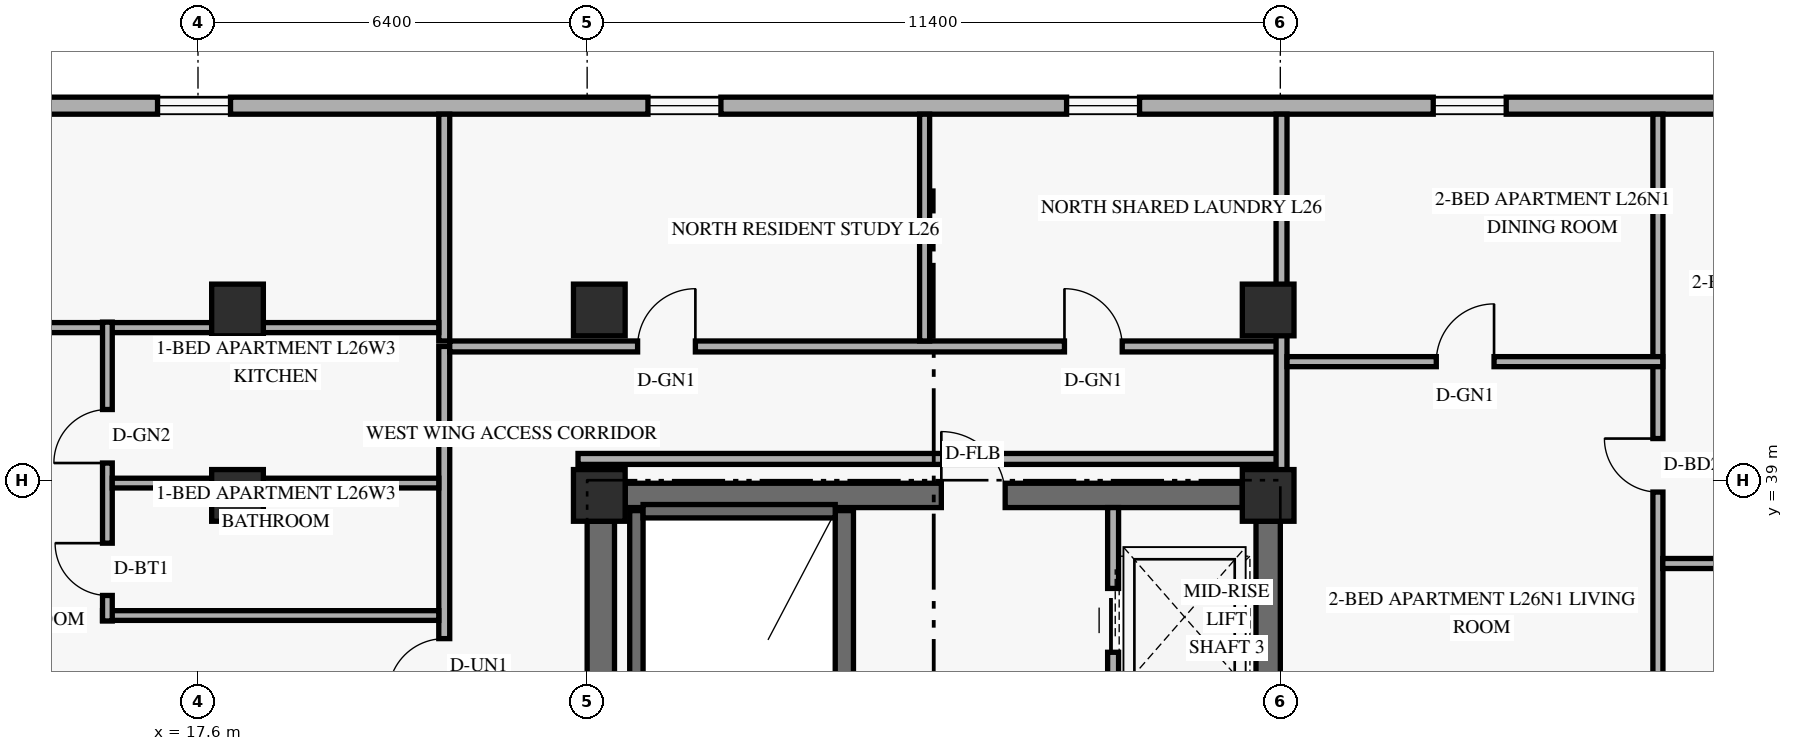
"""IFC4 building model, lengths in metres.
Left out: names, types, materials, properties, quantities, classifications, styles, units other than length and angle.
Written with IfcOpenShell. Run it as: python <this file> out.ifc"""

import sys

from ifc_helpers import new_model, si_unit, direction, frame, frame_2d, origin, origin_2d, place, context, subcontext, project, spatial, rectangle, extrude, element, fill, save


model = new_model("IFC4")
c1 = context("Model", 3, precision=1e-05, world=origin(), true_north=direction((0.0, 1.0)))
c2 = subcontext(c1, "Body", "Model", "MODEL_VIEW")
j1 = project(units=[si_unit("LENGTHUNIT", "METRE"), si_unit("PLANEANGLEUNIT", "RADIAN")], contexts=[c1])
p1 = place(None, origin())
s1 = spatial("IfcSite", under=j1, at=p1, CompositionType="ELEMENT")
p2 = place(p1, origin())
s2 = spatial("IfcBuilding", under=s1, at=p2, CompositionType="ELEMENT")
p3 = place(p2, frame((0.0, 0.0, 102.6)))
s3 = spatial("IfcBuildingStorey", under=s2, at=p3, CompositionType="ELEMENT", Elevation=102.6)
p4 = place(p3, frame((24.225, 30.625, 0.0), z_axis=(0.0, 0.0, 1.0), x_axis=(0.0, 1.0, 0.0)))
e1 = element("IfcWall", 1, at=p4, inside=s3, PredefinedType="SHEAR", context=c2, shape_type="SweptSolid", body=[
    extrude(rectangle(XDim=7.7, YDim=0.45, at=frame_2d((3.85, 0.0))), origin(), (0.0, 0.0, 1.0), 2.749),
])
p5 = place(p3, frame((35.2, 31.35, 0.0), z_axis=(0.0, 0.0, 1.0), x_axis=(0.0, 1.0, 0.0)))
e2 = element("IfcWall", 2, at=p5, inside=s3, PredefinedType="SHEAR", context=c2, shape_type="SweptSolid", body=[
    extrude(rectangle(XDim=6.975, YDim=0.4, at=frame_2d((3.487, 0.0))), origin(), (0.0, 0.0, 1.0), 2.749),
])
p6 = place(p3, frame((24.625, 38.75, 0.0), z_axis=(0.0, 0.0, 1.0), x_axis=(1.0, 0.0, 0.0)))
e3 = element("IfcWall", 3, at=p6, inside=s3, PredefinedType="SHEAR", context=c2, shape_type="SweptSolid", body=[
    extrude(rectangle(XDim=10.15, YDim=0.4, at=frame_2d((5.075, 0.0))), origin(), (0.0, 0.0, 1.0), 3.36),
])
p7 = place(p6, frame((5.2, 0.0, 0.0)))
e4 = element("IfcOpeningElement", 4, at=p7, cuts=e3, PredefinedType="OPENING", context=c2, shape_type="SweptSolid", body=[
    extrude(rectangle(XDim=1.05, YDim=2.15, at=frame_2d((0.525, 1.075))), frame((0.0, 0.21, 0.0), z_axis=(0.0, -1.0, 0.0), x_axis=(1.0, 0.0, 0.0)), (0.0, 0.0, 1.0), 0.42),
])
p8 = place(p3, frame((24.81, 30.74, 0.0), z_axis=(0.0, 0.0, 1.0), x_axis=(0.0, 1.0, 0.0)))
e5 = element("IfcWall", 5, at=p8, inside=s3, PredefinedType="SHEAR", context=c2, shape_type="SweptSolid", body=[
    extrude(rectangle(XDim=7.76, YDim=0.22, at=frame_2d((3.88, 0.0))), origin(), (0.0, 0.0, 1.0), 3.36),
])
p9 = place(p3, frame((28.23, 30.74, 0.0), z_axis=(0.0, 0.0, 1.0), x_axis=(0.0, 1.0, 0.0)))
e6 = element("IfcWall", 6, at=p9, inside=s3, PredefinedType="SHEAR", context=c2, shape_type="SweptSolid", body=[
    extrude(rectangle(XDim=7.76, YDim=0.3, at=frame_2d((3.88, 0.0))), origin(), (0.0, 0.0, 1.0), 3.36),
])
p10 = place(p3, frame((24.92, 38.49, 0.0), z_axis=(0.0, 0.0, 1.0), x_axis=(1.0, 0.0, 0.0)))
e7 = element("IfcWall", 7, at=p10, inside=s3, PredefinedType="SHEAR", context=c2, shape_type="SweptSolid", body=[
    extrude(rectangle(XDim=3.16, YDim=0.22, at=frame_2d((1.58, 0.0))), origin(), (0.0, 0.0, 1.0), 3.36),
])
for number, where, z_axis, x_axis in (
    (8, (18.25, 38.75, 0.0), (0.0, 0.0, 1.0), (1.0, 0.0, 0.0)),
    (9, (18.25, 41.8, 0.0), (0.0, 0.0, 1.0), (1.0, 0.0, 0.0)),
    (10, (24.2, 38.75, 0.0), (0.0, 0.0, 1.0), (1.0, 0.0, 0.0)),
    (11, (24.2, 41.8, 0.0), (0.0, 0.0, 1.0), (1.0, 0.0, 0.0)),
    (12, (35.2, 38.75, 0.0), (0.0, 0.0, 1.0), (1.0, 0.0, 0.0)),
    (13, (35.2, 41.8, 0.0), (0.0, 0.0, 1.0), (1.0, 0.0, 0.0)),
):
    element("IfcColumn", number, at=place(p3, frame(where, z_axis=z_axis, x_axis=x_axis)), inside=s3, PredefinedType="COLUMN", context=c2, shape_type="SweptSolid", body=[
        extrude(rectangle(XDim=0.85, YDim=0.85, at=origin_2d()), origin(), (0.0, 0.0, 1.0), 3.6),
    ])
p11 = place(p3, frame((49.98, 45.16, 0.0), z_axis=(0.0, 0.0, 1.0), x_axis=(-1.0, 0.0, 0.0)))
e14 = element("IfcWall", 14, at=p11, inside=s3, PredefinedType="SOLIDWALL", context=c2, shape_type="SweptSolid", body=[
    extrude(rectangle(XDim=36.56, YDim=0.28, at=frame_2d((18.28, 0.0))), origin(), (0.0, 0.0, 1.0), 3.36),
])
p12 = place(p11, frame((31.845, 0.0, 0.85)))
e15 = element("IfcOpeningElement", 15, at=p12, cuts=e14, PredefinedType="OPENING", context=c2, shape_type="SweptSolid", body=[
    extrude(rectangle(XDim=1.2, YDim=1.5, at=frame_2d((0.6, 0.75))), frame((0.0, 0.15, 0.0), z_axis=(0.0, -1.0, 0.0), x_axis=(1.0, 0.0, 0.0)), (0.0, 0.0, 1.0), 0.3),
])
p13 = place(p11, frame((23.78, 0.0, 0.85)))
e16 = element("IfcOpeningElement", 16, at=p13, cuts=e14, PredefinedType="OPENING", context=c2, shape_type="SweptSolid", body=[
    extrude(rectangle(XDim=1.2, YDim=1.5, at=frame_2d((0.6, 0.75))), frame((0.0, 0.15, 0.0), z_axis=(0.0, -1.0, 0.0), x_axis=(1.0, 0.0, 0.0)), (0.0, 0.0, 1.0), 0.3),
])
p14 = place(p11, frame((16.895, 0.0, 0.85)))
e17 = element("IfcOpeningElement", 17, at=p14, cuts=e14, PredefinedType="OPENING", context=c2, shape_type="SweptSolid", body=[
    extrude(rectangle(XDim=1.2, YDim=1.5, at=frame_2d((0.6, 0.75))), frame((0.0, 0.15, 0.0), z_axis=(0.0, -1.0, 0.0), x_axis=(1.0, 0.0, 0.0)), (0.0, 0.0, 1.0), 0.3),
])
p15 = place(p11, frame((10.865, 0.0, 0.85)))
e18 = element("IfcOpeningElement", 18, at=p15, cuts=e14, PredefinedType="OPENING", context=c2, shape_type="SweptSolid", body=[
    extrude(rectangle(XDim=1.2, YDim=1.5, at=frame_2d((0.6, 0.75))), frame((0.0, 0.15, 0.0), z_axis=(0.0, -1.0, 0.0), x_axis=(1.0, 0.0, 0.0)), (0.0, 0.0, 1.0), 0.3),
])
p16 = place(p11, frame((5.275, 0.0, 0.85)))
e19 = element("IfcOpeningElement", 19, at=p16, cuts=e14, PredefinedType="OPENING", context=c2, shape_type="SweptSolid", body=[
    extrude(rectangle(XDim=1.2, YDim=1.5, at=frame_2d((0.6, 0.75))), frame((0.0, 0.15, 0.0), z_axis=(0.0, -1.0, 0.0), x_axis=(1.0, 0.0, 0.0)), (0.0, 0.0, 1.0), 0.3),
])
p17 = place(p11, frame((1.09, 0.0, 0.85)))
e20 = element("IfcOpeningElement", 20, at=p17, cuts=e14, PredefinedType="OPENING", context=c2, shape_type="SweptSolid", body=[
    extrude(rectangle(XDim=1.2, YDim=1.5, at=frame_2d((0.6, 0.75))), frame((0.0, 0.15, 0.0), z_axis=(0.0, -1.0, 0.0), x_axis=(1.0, 0.0, 0.0)), (0.0, 0.0, 1.0), 0.3),
])
p18 = place(p3, frame((32.65, 31.35, 0.0), z_axis=(0.0, 0.0, 1.0), x_axis=(0.0, 1.0, 0.0)))
e21 = element("IfcWall", 21, at=p18, inside=s3, PredefinedType="STANDARD", context=c2, shape_type="SweptSolid", body=[
    extrude(rectangle(XDim=7.2, YDim=0.18, at=frame_2d((3.6, 0.0))), origin(), (0.0, 0.0, 1.0), 3.36),
])
p19 = place(p18, frame((0.52, 0.0, 0.0)))
e22 = element("IfcOpeningElement", 22, at=p19, cuts=e21, PredefinedType="OPENING", context=c2, shape_type="SweptSolid", body=[
    extrude(rectangle(XDim=1.05, YDim=2.2, at=frame_2d((0.525, 1.1))), frame((0.0, 0.1, 0.0), z_axis=(0.0, -1.0, 0.0), x_axis=(1.0, 0.0, 0.0)), (0.0, 0.0, 1.0), 0.2),
])
p20 = place(p18, frame((2.67, 0.0, 0.0)))
e23 = element("IfcOpeningElement", 23, at=p20, cuts=e21, PredefinedType="OPENING", context=c2, shape_type="SweptSolid", body=[
    extrude(rectangle(XDim=1.05, YDim=2.2, at=frame_2d((0.525, 1.1))), frame((0.0, 0.1, 0.0), z_axis=(0.0, -1.0, 0.0), x_axis=(1.0, 0.0, 0.0)), (0.0, 0.0, 1.0), 0.2),
])
p21 = place(p18, frame((4.82, 0.0, 0.0)))
e24 = element("IfcOpeningElement", 24, at=p21, cuts=e21, PredefinedType="OPENING", context=c2, shape_type="SweptSolid", body=[
    extrude(rectangle(XDim=1.05, YDim=2.2, at=frame_2d((0.525, 1.1))), frame((0.0, 0.1, 0.0), z_axis=(0.0, -1.0, 0.0), x_axis=(1.0, 0.0, 0.0)), (0.0, 0.0, 1.0), 0.2),
])
p22 = place(p3, frame((21.65, 6.8, 0.0), z_axis=(0.0, 0.0, 1.0), x_axis=(0.0, 1.0, 0.0)))
e25 = element("IfcWall", 25, at=p22, inside=s3, PredefinedType="STANDARD", context=c2, shape_type="SweptSolid", body=[
    extrude(rectangle(XDim=34.4, YDim=0.18, at=frame_2d((17.2, 0.0))), origin(), (0.0, 0.0, 1.0), 2.731),
])
p23 = place(p22, frame((3.592, 0.0, 0.0)))
e26 = element("IfcOpeningElement", 26, at=p23, cuts=e25, PredefinedType="OPENING", context=c2, shape_type="SweptSolid", body=[
    extrude(rectangle(XDim=0.92, YDim=2.15, at=frame_2d((0.46, 1.075))), frame((0.0, 0.1, 0.0), z_axis=(0.0, -1.0, 0.0), x_axis=(1.0, 0.0, 0.0)), (0.0, 0.0, 1.0), 0.2),
])
p24 = place(p22, frame((14.019, 0.0, 0.0)))
e27 = element("IfcOpeningElement", 27, at=p24, cuts=e25, PredefinedType="OPENING", context=c2, shape_type="SweptSolid", body=[
    extrude(rectangle(XDim=0.92, YDim=2.15, at=frame_2d((0.46, 1.075))), frame((0.0, 0.1, 0.0), z_axis=(0.0, -1.0, 0.0), x_axis=(1.0, 0.0, 0.0)), (0.0, 0.0, 1.0), 0.2),
])
p25 = place(p22, frame((28.675, 0.0, 0.0)))
e28 = element("IfcOpeningElement", 28, at=p25, cuts=e25, PredefinedType="OPENING", context=c2, shape_type="SweptSolid", body=[
    extrude(rectangle(XDim=0.92, YDim=2.15, at=frame_2d((0.46, 1.075))), frame((0.0, 0.1, 0.0), z_axis=(0.0, -1.0, 0.0), x_axis=(1.0, 0.0, 0.0)), (0.0, 0.0, 1.0), 0.2),
])
p26 = place(p3, frame((21.74, 41.2, 0.0), z_axis=(0.0, 0.0, 1.0), x_axis=(1.0, 0.0, 0.0)))
e29 = element("IfcWall", 29, at=p26, inside=s3, PredefinedType="STANDARD", context=c2, shape_type="SweptSolid", body=[
    extrude(rectangle(XDim=13.68, YDim=0.18, at=frame_2d((6.84, 0.0))), origin(), (0.0, 0.0, 1.0), 2.731),
])
p27 = place(p26, frame((3.09, 0.0, 0.0)))
e30 = element("IfcOpeningElement", 30, at=p27, cuts=e29, PredefinedType="OPENING", context=c2, shape_type="SweptSolid", body=[
    extrude(rectangle(XDim=0.95, YDim=2.15, at=frame_2d((0.475, 1.075))), frame((0.0, 0.1, 0.0), z_axis=(0.0, -1.0, 0.0), x_axis=(1.0, 0.0, 0.0)), (0.0, 0.0, 1.0), 0.2),
])
p28 = place(p26, frame((10.11, 0.0, 0.0)))
e31 = element("IfcOpeningElement", 31, at=p28, cuts=e29, PredefinedType="OPENING", context=c2, shape_type="SweptSolid", body=[
    extrude(rectangle(XDim=0.95, YDim=2.15, at=frame_2d((0.475, 1.075))), frame((0.0, 0.1, 0.0), z_axis=(0.0, -1.0, 0.0), x_axis=(1.0, 0.0, 0.0)), (0.0, 0.0, 1.0), 0.2),
])
p29 = place(p3, frame((23.85, 39.35, 0.0), z_axis=(0.0, 0.0, 1.0), x_axis=(1.0, 0.0, 0.0)))
e32 = element("IfcWall", 32, at=p29, inside=s3, PredefinedType="STANDARD", context=c2, shape_type="SweptSolid", body=[
    extrude(rectangle(XDim=11.57, YDim=0.18, at=frame_2d((5.785, 0.0))), origin(), (0.0, 0.0, 1.0), 2.731),
])
p30 = place(p3, frame((21.65, 41.29, 0.0), z_axis=(0.0, 0.0, 1.0), x_axis=(0.0, 1.0, 0.0)))
e33 = element("IfcWall", 33, at=p30, inside=s3, PredefinedType="PARTITIONING", context=c2, shape_type="SweptSolid", body=[
    extrude(rectangle(XDim=3.73, YDim=0.18, at=frame_2d((1.865, 0.0))), origin(), (0.0, 0.0, 1.0), 2.809),
])
p31 = place(p3, frame((35.42, 38.75, 0.0), z_axis=(0.0, 0.0, 1.0), x_axis=(0.0, 1.0, 0.0)))
e34 = element("IfcWall", 34, at=p31, inside=s3, PredefinedType="PARTITIONING", context=c2, shape_type="SweptSolid", body=[
    extrude(rectangle(XDim=6.27, YDim=0.18, at=frame_2d((3.135, 0.0))), origin(), (0.0, 0.0, 1.0), 2.731),
])
p32 = place(p3, frame((41.61, 29.55, 0.0), z_axis=(0.0, 0.0, 1.0), x_axis=(0.0, 1.0, 0.0)))
e35 = element("IfcWall", 35, at=p32, inside=s3, PredefinedType="PARTITIONING", context=c2, shape_type="SweptSolid", body=[
    extrude(rectangle(XDim=15.47, YDim=0.165, at=frame_2d((7.735, 0.0))), origin(), (0.0, 0.0, 1.0), 2.731),
])
p33 = place(p32, frame((4.917, 0.0, 0.0)))
e36 = element("IfcOpeningElement", 36, at=p33, cuts=e35, PredefinedType="OPENING", context=c2, shape_type="SweptSolid", body=[
    extrude(rectangle(XDim=0.88, YDim=2.14, at=frame_2d((0.44, 1.07))), frame((0.0, 0.093, 0.0), z_axis=(0.0, -1.0, 0.0), x_axis=(1.0, 0.0, 0.0)), (0.0, 0.0, 1.0), 0.185),
])
p34 = place(p32, frame((9.255, 0.0, 0.0)))
e37 = element("IfcOpeningElement", 37, at=p34, cuts=e35, PredefinedType="OPENING", context=c2, shape_type="SweptSolid", body=[
    extrude(rectangle(XDim=0.88, YDim=2.14, at=frame_2d((0.44, 1.07))), frame((0.0, 0.093, 0.0), z_axis=(0.0, -1.0, 0.0), x_axis=(1.0, 0.0, 0.0)), (0.0, 0.0, 1.0), 0.185),
])
p35 = place(p3, frame((35.51, 40.95, 0.0), z_axis=(0.0, 0.0, 1.0), x_axis=(1.0, 0.0, 0.0)))
e38 = element("IfcWall", 38, at=p35, inside=s3, PredefinedType="PARTITIONING", context=c2, shape_type="SweptSolid", body=[
    extrude(rectangle(XDim=6.18, YDim=0.165, at=frame_2d((3.09, 0.0))), origin(), (0.0, 0.0, 1.0), 3.36),
])
p36 = place(p35, frame((2.455, 0.0, 0.0)))
e39 = element("IfcOpeningElement", 39, at=p36, cuts=e38, PredefinedType="OPENING", context=c2, shape_type="SweptSolid", body=[
    extrude(rectangle(XDim=0.95, YDim=2.15, at=frame_2d((0.475, 1.075))), frame((0.0, 0.093, 0.0), z_axis=(0.0, -1.0, 0.0), x_axis=(1.0, 0.0, 0.0)), (0.0, 0.0, 1.0), 0.185),
])
p37 = place(p3, frame((41.69, 37.63, 0.0), z_axis=(0.0, 0.0, 1.0), x_axis=(1.0, 0.0, 0.0)))
e40 = element("IfcWall", 40, at=p37, inside=s3, PredefinedType="PARTITIONING", context=c2, shape_type="SweptSolid", body=[
    extrude(rectangle(XDim=4.82, YDim=0.165, at=frame_2d((2.41, 0.0))), origin(), (0.0, 0.0, 1.0), 2.731),
])
p38 = place(p3, frame((10.08, 41.51, 0.0), z_axis=(0.0, 0.0, 1.0), x_axis=(1.0, 0.0, 0.0)))
e41 = element("IfcWall", 41, at=p38, inside=s3, PredefinedType="PARTITIONING", context=c2, shape_type="SweptSolid", body=[
    extrude(rectangle(XDim=11.48, YDim=0.165, at=frame_2d((5.74, 0.0))), origin(), (0.0, 0.0, 1.0), 3.36),
])
p39 = place(p38, frame((2.41, 0.0, 0.0)))
e42 = element("IfcOpeningElement", 42, at=p39, cuts=e41, PredefinedType="OPENING", context=c2, shape_type="SweptSolid", body=[
    extrude(rectangle(XDim=0.9, YDim=2.14, at=frame_2d((0.45, 1.07))), frame((0.0, 0.093, 0.0), z_axis=(0.0, -1.0, 0.0), x_axis=(1.0, 0.0, 0.0)), (0.0, 0.0, 1.0), 0.185),
])
p40 = place(p3, frame((16.03, 36.774, 0.0), z_axis=(0.0, 0.0, 1.0), x_axis=(1.0, 0.0, 0.0)))
e43 = element("IfcWall", 43, at=p40, inside=s3, PredefinedType="PLUMBINGWALL", context=c2, shape_type="SweptSolid", body=[
    extrude(rectangle(XDim=5.53, YDim=0.16, at=frame_2d((2.765, 0.0))), origin(), (0.0, 0.0, 1.0), 2.731),
])
p41 = place(p3, frame((16.11, 36.685, 0.0), z_axis=(0.0, 0.0, 1.0), x_axis=(0.0, 1.0, 0.0)))
e44 = element("IfcWall", 44, at=p41, inside=s3, PredefinedType="PLUMBINGWALL", context=c2, shape_type="SweptSolid", body=[
    extrude(rectangle(XDim=4.916, YDim=0.16, at=frame_2d((2.458, 0.0))), origin(), (0.0, 0.0, 1.0), 2.731),
])
p42 = place(p41, frame((0.42, 0.0, 0.0)))
e45 = element("IfcOpeningElement", 45, at=p42, cuts=e44, PredefinedType="OPENING", context=c2, shape_type="SweptSolid", body=[
    extrude(rectangle(XDim=0.86, YDim=2.12, at=frame_2d((0.43, 1.06))), frame((0.0, 0.09, 0.0), z_axis=(0.0, -1.0, 0.0), x_axis=(1.0, 0.0, 0.0)), (0.0, 0.0, 1.0), 0.18),
])
p43 = place(p41, frame((2.598, 0.0, 0.0)))
e46 = element("IfcOpeningElement", 46, at=p43, cuts=e44, PredefinedType="OPENING", context=c2, shape_type="SweptSolid", body=[
    extrude(rectangle(XDim=0.88, YDim=2.12, at=frame_2d((0.44, 1.06))), frame((0.0, 0.09, 0.0), z_axis=(0.0, -1.0, 0.0), x_axis=(1.0, 0.0, 0.0)), (0.0, 0.0, 1.0), 0.18),
])
p44 = place(p3, frame((16.19, 38.953, 0.0), z_axis=(0.0, 0.0, 1.0), x_axis=(1.0, 0.0, 0.0)))
e47 = element("IfcWall", 47, at=p44, inside=s3, PredefinedType="PLUMBINGWALL", context=c2, shape_type="SweptSolid", body=[
    extrude(rectangle(XDim=5.37, YDim=0.16, at=frame_2d((2.685, 0.0))), origin(), (0.0, 0.0, 1.0), 2.731),
])
p45 = place(p3, frame((29.55, 41.29, 0.0), z_axis=(0.0, 0.0, 1.0), x_axis=(0.0, 1.0, 0.0)))
e48 = element("IfcWall", 48, at=p45, inside=s3, PredefinedType="PARTITIONING", context=c2, shape_type="SweptSolid", body=[
    extrude(rectangle(XDim=3.73, YDim=0.165, at=frame_2d((1.865, 0.0))), origin(), (0.0, 0.0, 1.0), 2.809),
])
p46 = place(p12, origin())
e49 = element("IfcWindow", 49, at=p46, inside=s3, PartitioningType="SINGLE_PANEL", PredefinedType="WINDOW", context=c2, shape_type="SweptSolid", body=[
    extrude(rectangle(XDim=1.2, YDim=1.5, at=frame_2d((0.6, 0.75))), frame((0.0, 0.03, 0.0), z_axis=(0.0, -1.0, 0.0), x_axis=(1.0, 0.0, 0.0)), (0.0, 0.0, 1.0), 0.06),
])
fill(e15, e49)
p47 = place(p13, origin())
e50 = element("IfcWindow", 50, at=p47, inside=s3, PartitioningType="SINGLE_PANEL", PredefinedType="WINDOW", context=c2, shape_type="SweptSolid", body=[
    extrude(rectangle(XDim=1.2, YDim=1.5, at=frame_2d((0.6, 0.75))), frame((0.0, 0.03, 0.0), z_axis=(0.0, -1.0, 0.0), x_axis=(1.0, 0.0, 0.0)), (0.0, 0.0, 1.0), 0.06),
])
fill(e16, e50)
p48 = place(p14, origin())
e51 = element("IfcWindow", 51, at=p48, inside=s3, PartitioningType="SINGLE_PANEL", PredefinedType="WINDOW", context=c2, shape_type="SweptSolid", body=[
    extrude(rectangle(XDim=1.2, YDim=1.5, at=frame_2d((0.6, 0.75))), frame((0.0, 0.03, 0.0), z_axis=(0.0, -1.0, 0.0), x_axis=(1.0, 0.0, 0.0)), (0.0, 0.0, 1.0), 0.06),
])
fill(e17, e51)
p49 = place(p15, origin())
e52 = element("IfcWindow", 52, at=p49, inside=s3, PartitioningType="SINGLE_PANEL", PredefinedType="WINDOW", context=c2, shape_type="SweptSolid", body=[
    extrude(rectangle(XDim=1.2, YDim=1.5, at=frame_2d((0.6, 0.75))), frame((0.0, 0.03, 0.0), z_axis=(0.0, -1.0, 0.0), x_axis=(1.0, 0.0, 0.0)), (0.0, 0.0, 1.0), 0.06),
])
fill(e18, e52)
p50 = place(p21, origin())
e53 = element("IfcDoor", 53, at=p50, inside=s3, OperationType="SLIDING_TO_LEFT", PredefinedType="DOOR", context=c2, shape_type="SweptSolid", body=[
    extrude(rectangle(XDim=1.05, YDim=2.2, at=frame_2d((0.525, 1.1))), frame((0.0, 0.025, 0.0), z_axis=(0.0, -1.0, 0.0), x_axis=(1.0, 0.0, 0.0)), (0.0, 0.0, 1.0), 0.05),
])
fill(e24, e53)
p51 = place(p7, frame((1.05, 0.0, 0.0), z_axis=(0.0, 0.0, 1.0), x_axis=(-1.0, 0.0, 0.0)))
e54 = element("IfcDoor", 54, at=p51, inside=s3, OperationType="SINGLE_SWING_RIGHT", PredefinedType="DOOR", context=c2, shape_type="SweptSolid", body=[
    extrude(rectangle(XDim=1.05, YDim=2.15, at=frame_2d((0.525, 1.075))), frame((0.0, 0.025, 0.0), z_axis=(0.0, -1.0, 0.0), x_axis=(1.0, 0.0, 0.0)), (0.0, 0.0, 1.0), 0.05),
])
fill(e4, e54)
p52 = place(p36, origin())
e55 = element("IfcDoor", 55, at=p52, inside=s3, OperationType="SINGLE_SWING_RIGHT", PredefinedType="DOOR", context=c2, shape_type="SweptSolid", body=[
    extrude(rectangle(XDim=0.95, YDim=2.15, at=frame_2d((0.475, 1.075))), frame((0.0, 0.025, 0.0), z_axis=(0.0, -1.0, 0.0), x_axis=(1.0, 0.0, 0.0)), (0.0, 0.0, 1.0), 0.05),
])
fill(e39, e55)
p53 = place(p34, origin())
e56 = element("IfcDoor", 56, at=p53, inside=s3, OperationType="SINGLE_SWING_RIGHT", PredefinedType="DOOR", context=c2, shape_type="SweptSolid", body=[
    extrude(rectangle(XDim=0.88, YDim=2.14, at=frame_2d((0.44, 1.07))), frame((0.0, 0.025, 0.0), z_axis=(0.0, -1.0, 0.0), x_axis=(1.0, 0.0, 0.0)), (0.0, 0.0, 1.0), 0.05),
])
fill(e37, e56)
p54 = place(p25, origin())
e57 = element("IfcDoor", 57, at=p54, inside=s3, OperationType="SINGLE_SWING_LEFT", PredefinedType="DOOR", context=c2, shape_type="SweptSolid", body=[
    extrude(rectangle(XDim=0.92, YDim=2.15, at=frame_2d((0.46, 1.075))), frame((0.0, 0.025, 0.0), z_axis=(0.0, -1.0, 0.0), x_axis=(1.0, 0.0, 0.0)), (0.0, 0.0, 1.0), 0.05),
])
fill(e28, e57)
p55 = place(p42, origin())
e58 = element("IfcDoor", 58, at=p55, inside=s3, OperationType="SINGLE_SWING_RIGHT", PredefinedType="DOOR", context=c2, shape_type="SweptSolid", body=[
    extrude(rectangle(XDim=0.86, YDim=2.12, at=frame_2d((0.43, 1.06))), frame((0.0, 0.025, 0.0), z_axis=(0.0, -1.0, 0.0), x_axis=(1.0, 0.0, 0.0)), (0.0, 0.0, 1.0), 0.05),
])
fill(e45, e58)
p56 = place(p43, origin())
e59 = element("IfcDoor", 59, at=p56, inside=s3, OperationType="SINGLE_SWING_LEFT", PredefinedType="DOOR", context=c2, shape_type="SweptSolid", body=[
    extrude(rectangle(XDim=0.88, YDim=2.12, at=frame_2d((0.44, 1.06))), frame((0.0, 0.025, 0.0), z_axis=(0.0, -1.0, 0.0), x_axis=(1.0, 0.0, 0.0)), (0.0, 0.0, 1.0), 0.05),
])
fill(e46, e59)
p57 = place(p27, origin())
e60 = element("IfcDoor", 60, at=p57, inside=s3, OperationType="SINGLE_SWING_RIGHT", PredefinedType="DOOR", context=c2, shape_type="SweptSolid", body=[
    extrude(rectangle(XDim=0.95, YDim=2.15, at=frame_2d((0.475, 1.075))), frame((0.0, 0.025, 0.0), z_axis=(0.0, -1.0, 0.0), x_axis=(1.0, 0.0, 0.0)), (0.0, 0.0, 1.0), 0.05),
])
fill(e30, e60)
p58 = place(p28, origin())
e61 = element("IfcDoor", 61, at=p58, inside=s3, OperationType="SINGLE_SWING_LEFT", PredefinedType="DOOR", context=c2, shape_type="SweptSolid", body=[
    extrude(rectangle(XDim=0.95, YDim=2.15, at=frame_2d((0.475, 1.075))), frame((0.0, 0.025, 0.0), z_axis=(0.0, -1.0, 0.0), x_axis=(1.0, 0.0, 0.0)), (0.0, 0.0, 1.0), 0.05),
])
fill(e31, e61)
save(model, sys.argv[1])
